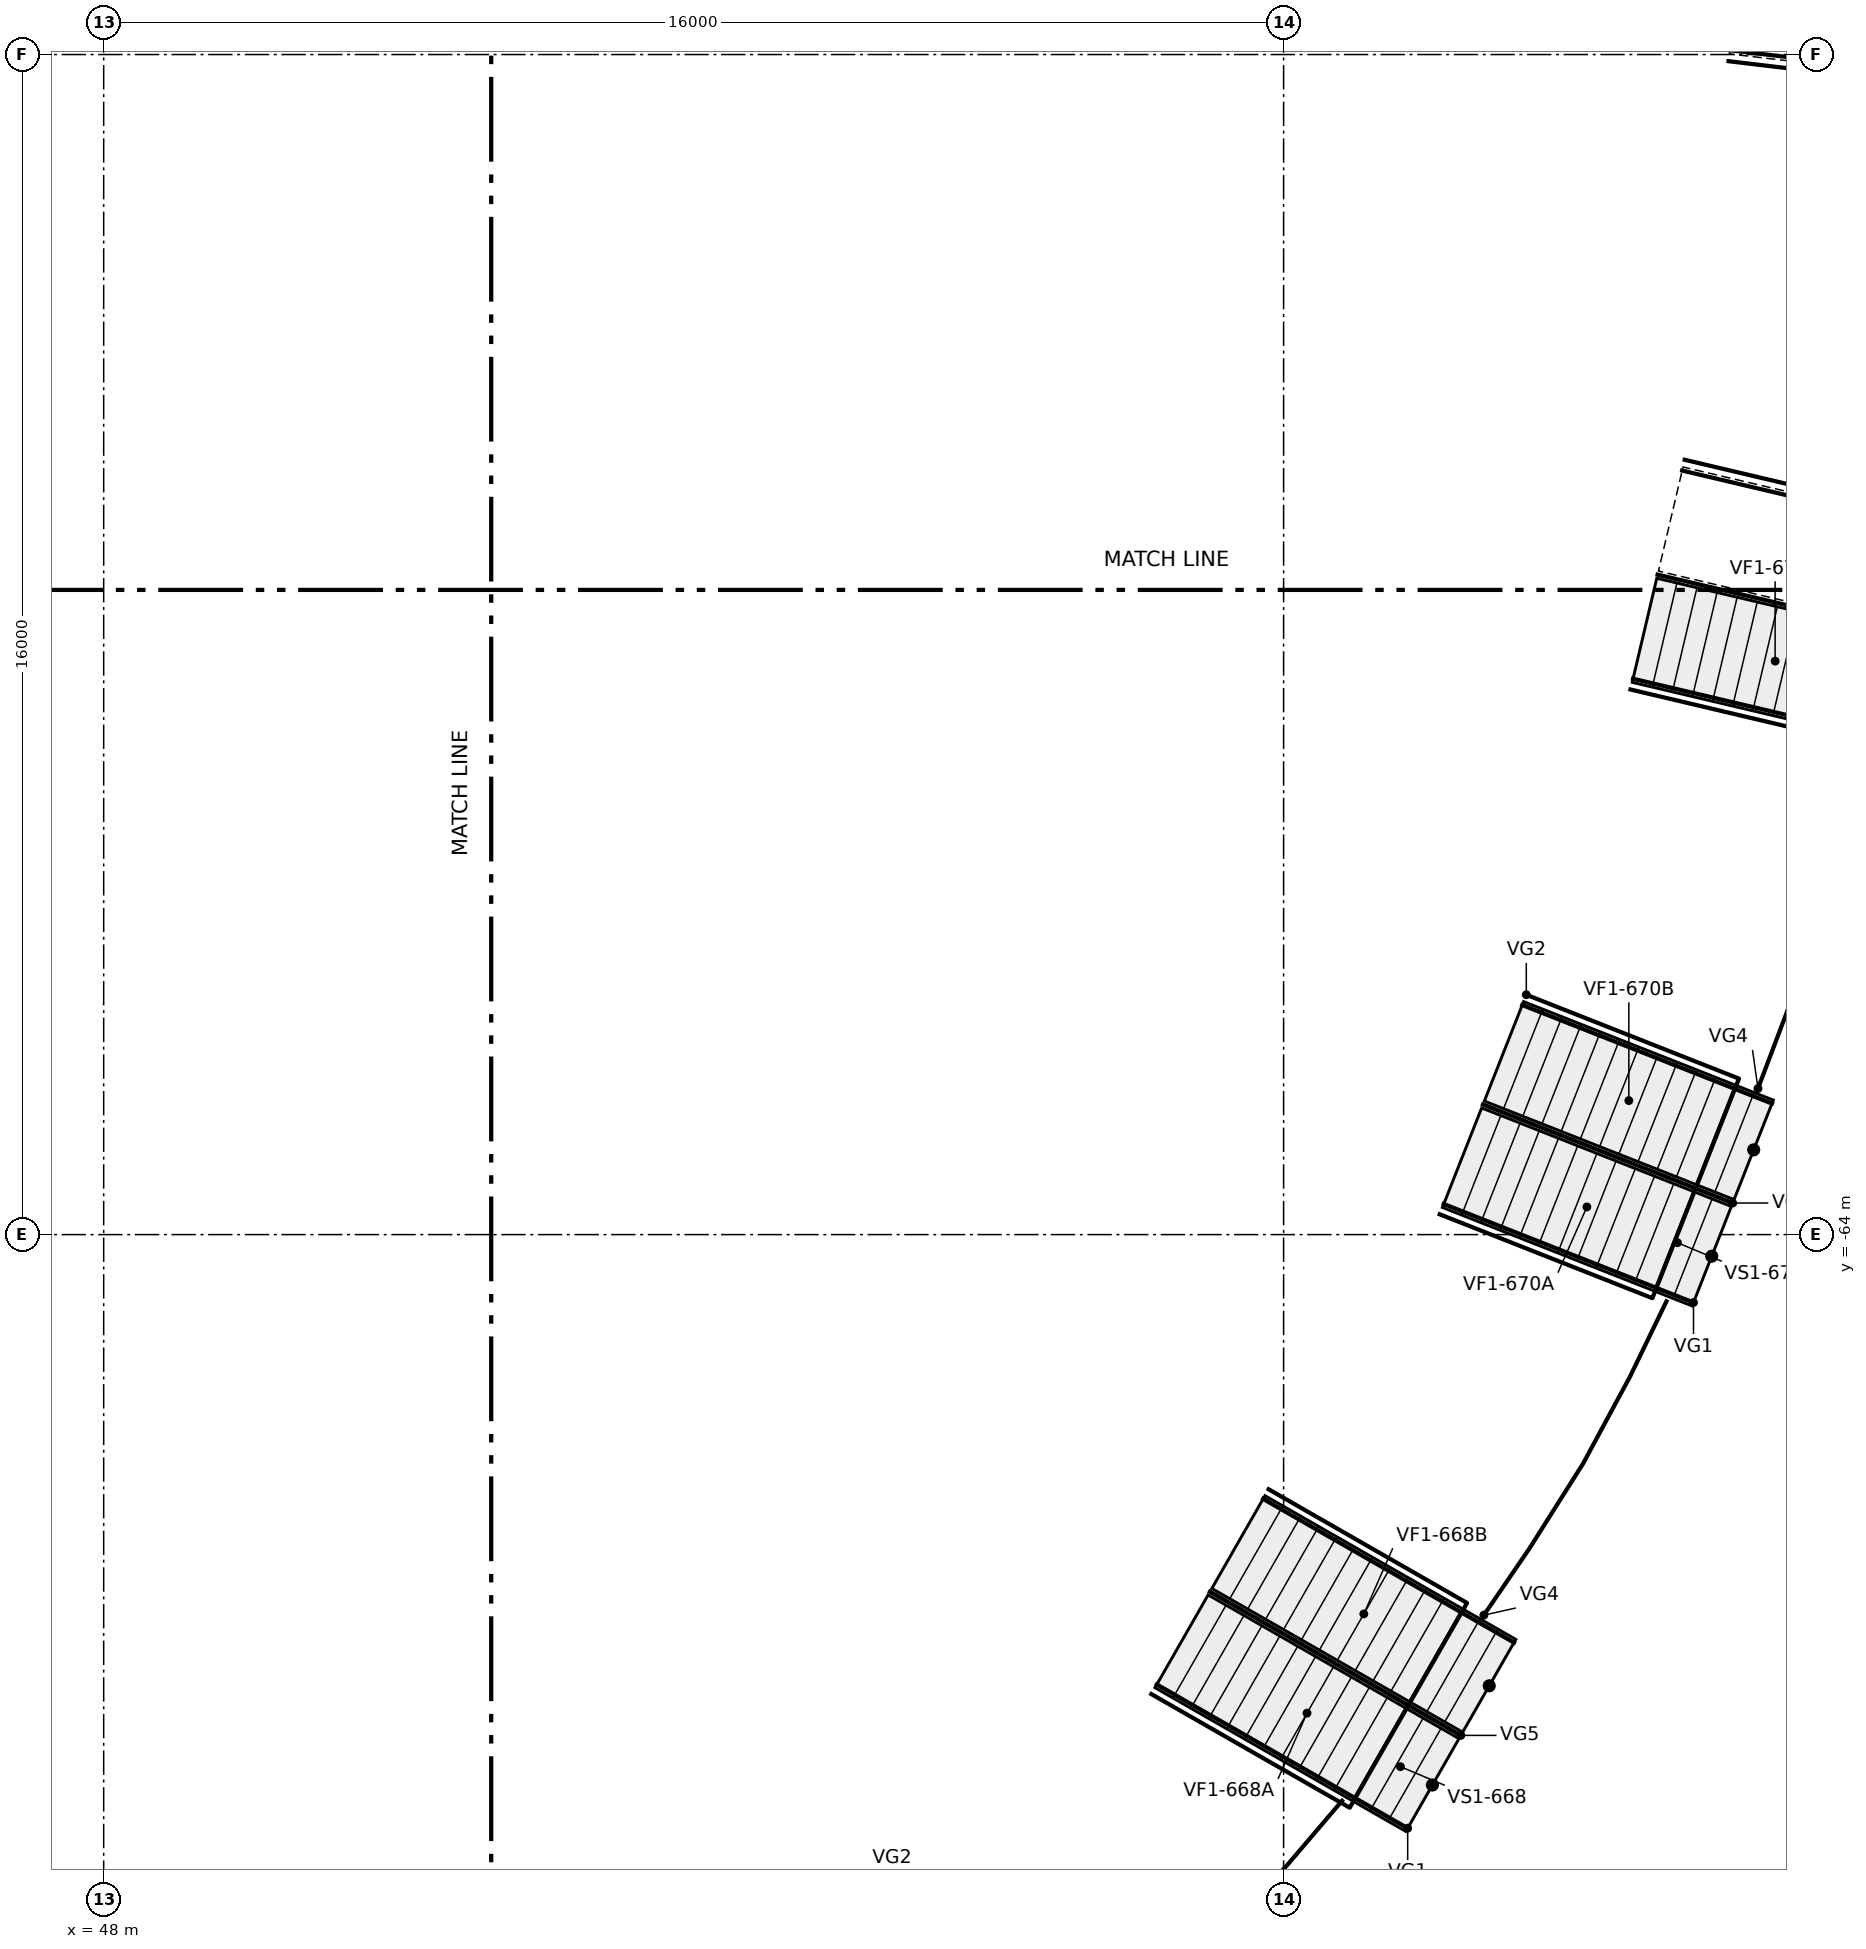
"""IFC4 building model, lengths in metres.
Left out: names, types, materials, properties, quantities, classifications, styles, units other than length and angle.
Written with IfcOpenShell. Run it as: python <this file> out.ifc"""

import sys

from ifc_helpers import new_model, si_unit, direction, frame, origin, origin_2d, place, context, subcontext, project, spatial, circle, extrude, element, save


model = new_model("IFC4")
c1 = context("Model", 3, precision=1e-05, world=origin(), true_north=direction((0.0, 1.0)))
c2 = subcontext(c1, "Body", "Model", "MODEL_VIEW")
j1 = project(units=[si_unit("LENGTHUNIT", "METRE"), si_unit("PLANEANGLEUNIT", "RADIAN")], contexts=[c1])
p1 = place(None, origin())
s1 = spatial("IfcSite", under=j1, at=p1, CompositionType="ELEMENT")
p2 = place(p1, origin())
s2 = spatial("IfcBuilding", under=s1, at=p2, CompositionType="ELEMENT")
p3 = place(p2, frame((0.0, 0.0, 18.0)))
s3 = spatial("IfcBuildingStorey", under=s2, at=p3, CompositionType="ELEMENT", Elevation=18.0)
p4 = place(p3, frame((67.972, -67.058, 0.0), z_axis=(0.0, 0.0, 1.0), x_axis=(1.0, 0.0, 0.0)))
e1 = element("IfcColumn", 1, at=p4, inside=s3, PredefinedType="COLUMN", context=c2, shape_type="SweptSolid", body=[
    extrude(circle(Radius=0.45, at=origin_2d()), origin(), (0.0, 0.0, 1.0), 3.954),
])
p5 = place(p3, frame((71.17, -59.677, 0.0), z_axis=(0.0, 0.0, 1.0), x_axis=(1.0, 0.0, 0.0)))
e2 = element("IfcColumn", 2, at=p5, inside=s3, PredefinedType="COLUMN", context=c2, shape_type="SweptSolid", body=[
    extrude(circle(Radius=0.45, at=origin_2d()), origin(), (0.0, 0.0, 1.0), 3.698),
])
save(model, sys.argv[1])
